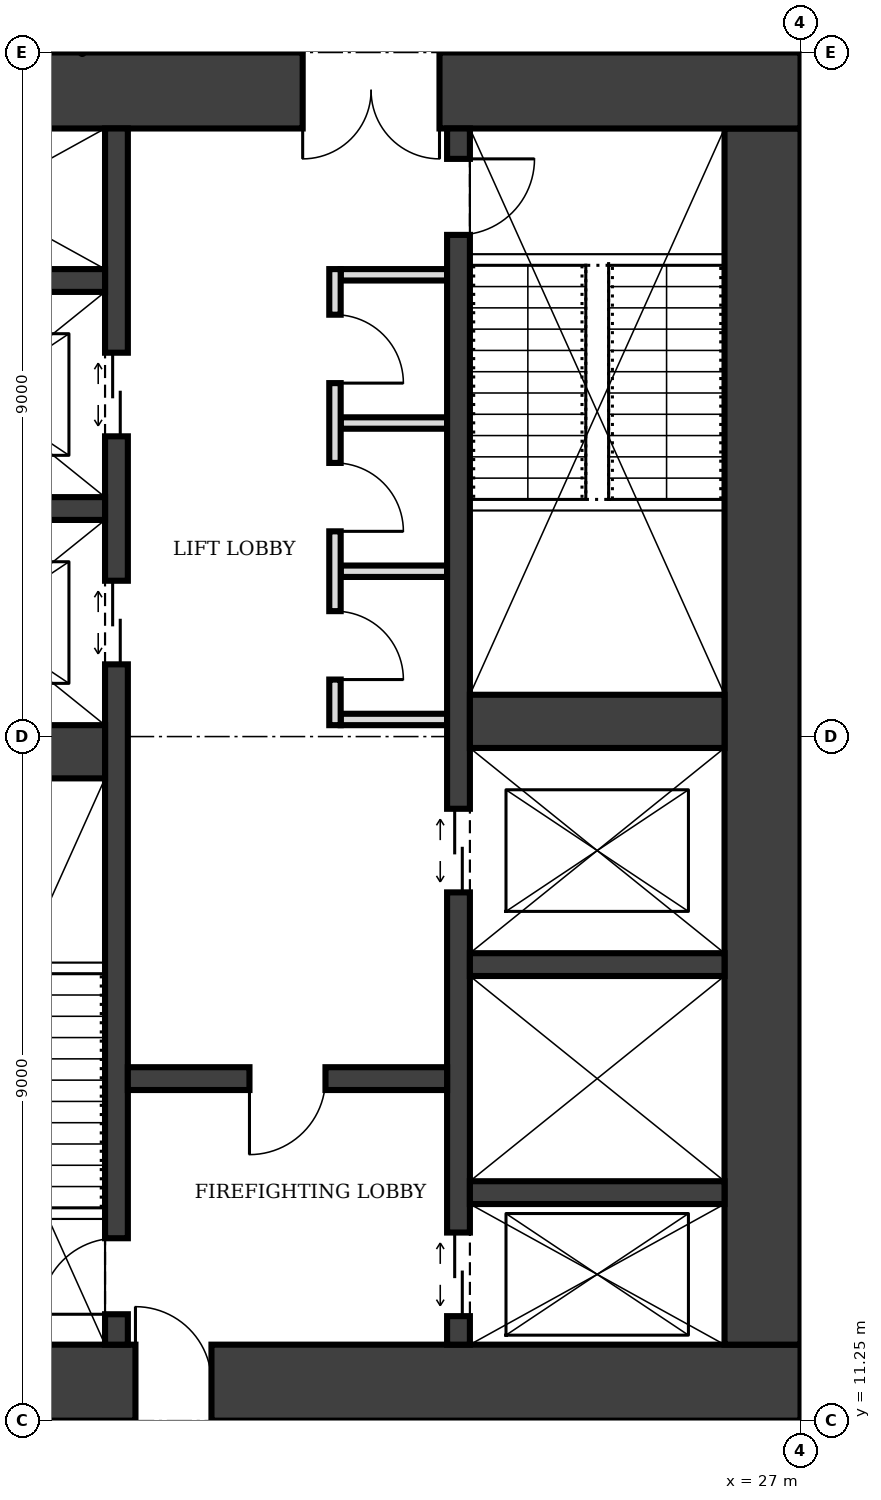
"""IFC4 building model, lengths in metres.
Left out: names, types, materials, properties, quantities, classifications, styles, units other than length and angle.
Written with IfcOpenShell. Run it as: python <this file> out.ifc"""

import sys

from ifc_helpers import new_model, si_unit, direction, frame, frame_2d, origin, place, context, subcontext, project, spatial, rectangle, extrude, element, fill, save


model = new_model("IFC4")
c1 = context("Model", 3, precision=1e-05, world=origin(), true_north=direction((0.0, 1.0)))
c2 = subcontext(c1, "Body", "Model", "MODEL_VIEW")
j1 = project(units=[si_unit("LENGTHUNIT", "METRE"), si_unit("PLANEANGLEUNIT", "RADIAN")], contexts=[c1])
p1 = place(None, origin())
s1 = spatial("IfcSite", under=j1, at=p1, CompositionType="ELEMENT")
p2 = place(p1, origin())
s2 = spatial("IfcBuilding", under=s1, at=p2, CompositionType="ELEMENT")
p3 = place(p2, frame((0.0, 0.0, 61.0)))
s3 = spatial("IfcBuildingStorey", under=s2, at=p3, CompositionType="ELEMENT", Elevation=61.0)
p4 = place(p3, frame((13.5, 11.75, 0.0), z_axis=(0.0, 0.0, 1.0), x_axis=(1.0, 0.0, 0.0)))
e1 = element("IfcWall", 1, at=p4, inside=s3, PredefinedType="SHEAR", context=c2, shape_type="SweptSolid", body=[
    extrude(rectangle(XDim=13.5, YDim=1.0, at=frame_2d((6.75, 0.0))), origin(), (0.0, 0.0, 1.0), 4.0),
])
p5 = place(p4, frame((4.75, 0.0, 0.0)))
e2 = element("IfcOpeningElement", 2, at=p5, cuts=e1, PredefinedType="OPENING", context=c2, shape_type="SweptSolid", body=[
    extrude(rectangle(XDim=1.0, YDim=2.1, at=frame_2d((0.5, 1.05))), frame((0.0, 0.51, 0.0), z_axis=(0.0, -1.0, 0.0), x_axis=(1.0, 0.0, 0.0)), (0.0, 0.0, 1.0), 1.02),
])
p6 = place(p3, frame((26.5, 12.25, 0.0), z_axis=(0.0, 0.0, 1.0), x_axis=(0.0, 1.0, 0.0)))
e3 = element("IfcWall", 3, at=p6, inside=s3, PredefinedType="SHEAR", context=c2, shape_type="SweptSolid", body=[
    extrude(rectangle(XDim=16.0, YDim=1.0, at=frame_2d((8.0, 0.0))), origin(), (0.0, 0.0, 1.0), 4.0),
])
p7 = place(p3, frame((27.0, 28.75, 0.0), z_axis=(0.0, 0.0, 1.0), x_axis=(-1.0, 0.0, 0.0)))
e4 = element("IfcWall", 4, at=p7, inside=s3, PredefinedType="SHEAR", context=c2, shape_type="SweptSolid", body=[
    extrude(rectangle(XDim=13.5, YDim=1.0, at=frame_2d((6.75, 0.0))), origin(), (0.0, 0.0, 1.0), 4.0),
])
p8 = place(p7, frame((4.75, 0.0, 0.0)))
e5 = element("IfcOpeningElement", 5, at=p8, cuts=e4, PredefinedType="OPENING", context=c2, shape_type="SweptSolid", body=[
    extrude(rectangle(XDim=1.8, YDim=2.1, at=frame_2d((0.9, 1.05))), frame((0.0, 0.51, 0.0), z_axis=(0.0, -1.0, 0.0), x_axis=(1.0, 0.0, 0.0)), (0.0, 0.0, 1.0), 1.02),
])
p9 = place(p3, frame((18.0, 12.25, 0.0), z_axis=(0.0, 0.0, 1.0), x_axis=(0.0, 1.0, 0.0)))
e6 = element("IfcWall", 6, at=p9, inside=s3, PredefinedType="SHEAR", context=c2, shape_type="SweptSolid", body=[
    extrude(rectangle(XDim=16.0, YDim=0.3, at=frame_2d((8.0, 0.0))), origin(), (0.0, 0.0, 1.0), 4.0),
])
p10 = place(p9, frame((0.4, 0.0, 0.0)))
e7 = element("IfcOpeningElement", 7, at=p10, cuts=e6, PredefinedType="OPENING", context=c2, shape_type="SweptSolid", body=[
    extrude(rectangle(XDim=1.0, YDim=2.1, at=frame_2d((0.5, 1.05))), frame((0.0, 0.16, 0.0), z_axis=(0.0, -1.0, 0.0), x_axis=(1.0, 0.0, 0.0)), (0.0, 0.0, 1.0), 0.32),
])
p11 = place(p9, frame((8.95, 0.0, 0.0)))
e8 = element("IfcOpeningElement", 8, at=p11, cuts=e6, PredefinedType="OPENING", context=c2, shape_type="SweptSolid", body=[
    extrude(rectangle(XDim=1.1, YDim=2.1, at=frame_2d((0.55, 1.05))), frame((0.0, 0.16, 0.0), z_axis=(0.0, -1.0, 0.0), x_axis=(1.0, 0.0, 0.0)), (0.0, 0.0, 1.0), 0.32),
])
p12 = place(p9, frame((11.95, 0.0, 0.0)))
e9 = element("IfcOpeningElement", 9, at=p12, cuts=e6, PredefinedType="OPENING", context=c2, shape_type="SweptSolid", body=[
    extrude(rectangle(XDim=1.1, YDim=2.1, at=frame_2d((0.55, 1.05))), frame((0.0, 0.16, 0.0), z_axis=(0.0, -1.0, 0.0), x_axis=(1.0, 0.0, 0.0)), (0.0, 0.0, 1.0), 0.32),
])
p13 = place(p3, frame((22.5, 12.25, 0.0), z_axis=(0.0, 0.0, 1.0), x_axis=(0.0, 1.0, 0.0)))
e10 = element("IfcWall", 10, at=p13, inside=s3, PredefinedType="SHEAR", context=c2, shape_type="SweptSolid", body=[
    extrude(rectangle(XDim=16.0, YDim=0.3, at=frame_2d((8.0, 0.0))), origin(), (0.0, 0.0, 1.0), 4.0),
])
p14 = place(p13, frame((14.6, 0.0, 0.0)))
e11 = element("IfcOpeningElement", 11, at=p14, cuts=e10, PredefinedType="OPENING", context=c2, shape_type="SweptSolid", body=[
    extrude(rectangle(XDim=1.0, YDim=2.1, at=frame_2d((0.5, 1.05))), frame((0.0, 0.16, 0.0), z_axis=(0.0, -1.0, 0.0), x_axis=(1.0, 0.0, 0.0)), (0.0, 0.0, 1.0), 0.32),
])
p15 = place(p13, frame((0.375, 0.0, 0.0)))
e12 = element("IfcOpeningElement", 12, at=p15, cuts=e10, PredefinedType="OPENING", context=c2, shape_type="SweptSolid", body=[
    extrude(rectangle(XDim=1.1, YDim=2.1, at=frame_2d((0.55, 1.05))), frame((0.0, 0.16, 0.0), z_axis=(0.0, -1.0, 0.0), x_axis=(1.0, 0.0, 0.0)), (0.0, 0.0, 1.0), 0.32),
])
p16 = place(p13, frame((5.95, 0.0, 0.0)))
e13 = element("IfcOpeningElement", 13, at=p16, cuts=e10, PredefinedType="OPENING", context=c2, shape_type="SweptSolid", body=[
    extrude(rectangle(XDim=1.1, YDim=2.1, at=frame_2d((0.55, 1.05))), frame((0.0, 0.16, 0.0), z_axis=(0.0, -1.0, 0.0), x_axis=(1.0, 0.0, 0.0)), (0.0, 0.0, 1.0), 0.32),
])
p17 = place(p3, frame((14.5, 20.05, 0.0), z_axis=(0.0, 0.0, 1.0), x_axis=(1.0, 0.0, 0.0)))
e14 = element("IfcWall", 14, at=p17, inside=s3, PredefinedType="SHEAR", context=c2, shape_type="SweptSolid", body=[
    extrude(rectangle(XDim=3.35, YDim=0.7, at=frame_2d((1.675, 0.0))), origin(), (0.0, 0.0, 1.0), 4.0),
])
p18 = place(p3, frame((18.15, 15.75, 0.0), z_axis=(0.0, 0.0, 1.0), x_axis=(1.0, 0.0, 0.0)))
e15 = element("IfcWall", 15, at=p18, inside=s3, PredefinedType="SHEAR", context=c2, shape_type="SweptSolid", body=[
    extrude(rectangle(XDim=4.2, YDim=0.3, at=frame_2d((2.1, 0.0))), origin(), (0.0, 0.0, 1.0), 4.0),
])
p19 = place(p18, frame((1.6, 0.0, 0.0)))
e16 = element("IfcOpeningElement", 16, at=p19, cuts=e15, PredefinedType="OPENING", context=c2, shape_type="SweptSolid", body=[
    extrude(rectangle(XDim=1.0, YDim=2.1, at=frame_2d((0.5, 1.05))), frame((0.0, 0.16, 0.0), z_axis=(0.0, -1.0, 0.0), x_axis=(1.0, 0.0, 0.0)), (0.0, 0.0, 1.0), 0.32),
])
for number, where, z_axis, x_axis in (
    (17, (22.65, 14.25, 0.0), (0.0, 0.0, 1.0), (1.0, 0.0, 0.0)),
    (18, (22.65, 17.25, 0.0), (0.0, 0.0, 1.0), (1.0, 0.0, 0.0)),
):
    element("IfcWall", number, at=place(p3, frame(where, z_axis=z_axis, x_axis=x_axis)), inside=s3, PredefinedType="SHEAR", context=c2, shape_type="SweptSolid", body=[
        extrude(rectangle(XDim=3.35, YDim=0.3, at=frame_2d((1.675, 0.0))), origin(), (0.0, 0.0, 1.0), 4.0),
    ])
p20 = place(p3, frame((22.65, 20.45, 0.0), z_axis=(0.0, 0.0, 1.0), x_axis=(1.0, 0.0, 0.0)))
e19 = element("IfcWall", 19, at=p20, inside=s3, PredefinedType="SHEAR", context=c2, shape_type="SweptSolid", body=[
    extrude(rectangle(XDim=3.35, YDim=0.7, at=frame_2d((1.675, 0.0))), origin(), (0.0, 0.0, 1.0), 4.0),
])
for number, where, z_axis, x_axis in (
    (20, (14.5, 23.25, 0.0), (0.0, 0.0, 1.0), (1.0, 0.0, 0.0)),
    (21, (14.5, 26.25, 0.0), (0.0, 0.0, 1.0), (1.0, 0.0, 0.0)),
):
    element("IfcWall", number, at=place(p3, frame(where, z_axis=z_axis, x_axis=x_axis)), inside=s3, PredefinedType="SHEAR", context=c2, shape_type="SweptSolid", body=[
        extrude(rectangle(XDim=3.35, YDim=0.3, at=frame_2d((1.675, 0.0))), origin(), (0.0, 0.0, 1.0), 4.0),
    ])
p21 = place(p3, frame((20.875, 20.4, 0.0), z_axis=(0.0, 0.0, 1.0), x_axis=(0.0, 1.0, 0.0)))
e22 = element("IfcWall", 22, at=p21, inside=s3, PredefinedType="PARTITIONING", context=c2, shape_type="SweptSolid", body=[
    extrude(rectangle(XDim=6.0, YDim=0.15, at=frame_2d((3.0, 0.0))), origin(), (0.0, 0.0, 1.0), 3.75),
])
p22 = place(p21, frame((0.6, 0.0, 0.0)))
e23 = element("IfcOpeningElement", 23, at=p22, cuts=e22, PredefinedType="OPENING", context=c2, shape_type="SweptSolid", body=[
    extrude(rectangle(XDim=0.9, YDim=2.1, at=frame_2d((0.45, 1.05))), frame((0.0, 0.085, 0.0), z_axis=(0.0, -1.0, 0.0), x_axis=(1.0, 0.0, 0.0)), (0.0, 0.0, 1.0), 0.17),
])
p23 = place(p21, frame((2.55, 0.0, 0.0)))
e24 = element("IfcOpeningElement", 24, at=p23, cuts=e22, PredefinedType="OPENING", context=c2, shape_type="SweptSolid", body=[
    extrude(rectangle(XDim=0.9, YDim=2.1, at=frame_2d((0.45, 1.05))), frame((0.0, 0.085, 0.0), z_axis=(0.0, -1.0, 0.0), x_axis=(1.0, 0.0, 0.0)), (0.0, 0.0, 1.0), 0.17),
])
p24 = place(p21, frame((4.5, 0.0, 0.0)))
e25 = element("IfcOpeningElement", 25, at=p24, cuts=e22, PredefinedType="OPENING", context=c2, shape_type="SweptSolid", body=[
    extrude(rectangle(XDim=0.9, YDim=2.1, at=frame_2d((0.45, 1.05))), frame((0.0, 0.085, 0.0), z_axis=(0.0, -1.0, 0.0), x_axis=(1.0, 0.0, 0.0)), (0.0, 0.0, 1.0), 0.17),
])
for number, where, z_axis, x_axis in (
    (26, (20.95, 20.475, 0.0), (0.0, 0.0, 1.0), (1.0, 0.0, 0.0)),
    (27, (20.95, 22.425, 0.0), (0.0, 0.0, 1.0), (1.0, 0.0, 0.0)),
    (28, (20.95, 24.375, 0.0), (0.0, 0.0, 1.0), (1.0, 0.0, 0.0)),
    (29, (20.95, 26.325, 0.0), (0.0, 0.0, 1.0), (1.0, 0.0, 0.0)),
):
    element("IfcWall", number, at=place(p3, frame(where, z_axis=z_axis, x_axis=x_axis)), inside=s3, PredefinedType="PARTITIONING", context=c2, shape_type="SweptSolid", body=[
        extrude(rectangle(XDim=1.4, YDim=0.15, at=frame_2d((0.7, 0.0))), origin(), (0.0, 0.0, 1.0), 3.75),
    ])
p25 = place(p5, origin())
e30 = element("IfcDoor", 30, at=p25, inside=s3, OperationType="SINGLE_SWING_LEFT", PredefinedType="DOOR", context=c2, shape_type="SweptSolid", body=[
    extrude(rectangle(XDim=1.0, YDim=2.1, at=frame_2d((0.5, 1.05))), frame((0.0, 0.025, 0.0), z_axis=(0.0, -1.0, 0.0), x_axis=(1.0, 0.0, 0.0)), (0.0, 0.0, 1.0), 0.05),
])
fill(e2, e30)
p26 = place(p8, origin())
e31 = element("IfcDoor", 31, at=p26, inside=s3, OperationType="DOUBLE_DOOR_SINGLE_SWING", PredefinedType="DOOR", context=c2, shape_type="SweptSolid", body=[
    extrude(rectangle(XDim=1.8, YDim=2.1, at=frame_2d((0.9, 1.05))), frame((0.0, 0.025, 0.0), z_axis=(0.0, -1.0, 0.0), x_axis=(1.0, 0.0, 0.0)), (0.0, 0.0, 1.0), 0.05),
])
fill(e5, e31)
p27 = place(p19, frame((1.0, 0.0, 0.0), z_axis=(0.0, 0.0, 1.0), x_axis=(-1.0, 0.0, 0.0)))
e32 = element("IfcDoor", 32, at=p27, inside=s3, OperationType="SINGLE_SWING_RIGHT", PredefinedType="DOOR", context=c2, shape_type="SweptSolid", body=[
    extrude(rectangle(XDim=1.0, YDim=2.1, at=frame_2d((0.5, 1.05))), frame((0.0, 0.025, 0.0), z_axis=(0.0, -1.0, 0.0), x_axis=(1.0, 0.0, 0.0)), (0.0, 0.0, 1.0), 0.05),
])
fill(e16, e32)
p28 = place(p10, origin())
e33 = element("IfcDoor", 33, at=p28, inside=s3, OperationType="SINGLE_SWING_LEFT", PredefinedType="DOOR", context=c2, shape_type="SweptSolid", body=[
    extrude(rectangle(XDim=1.0, YDim=2.1, at=frame_2d((0.5, 1.05))), frame((0.0, 0.025, 0.0), z_axis=(0.0, -1.0, 0.0), x_axis=(1.0, 0.0, 0.0)), (0.0, 0.0, 1.0), 0.05),
])
fill(e7, e33)
p29 = place(p14, frame((1.0, 0.0, 0.0), z_axis=(0.0, 0.0, 1.0), x_axis=(-1.0, 0.0, 0.0)))
e34 = element("IfcDoor", 34, at=p29, inside=s3, OperationType="SINGLE_SWING_LEFT", PredefinedType="DOOR", context=c2, shape_type="SweptSolid", body=[
    extrude(rectangle(XDim=1.0, YDim=2.1, at=frame_2d((0.5, 1.05))), frame((0.0, 0.025, 0.0), z_axis=(0.0, -1.0, 0.0), x_axis=(1.0, 0.0, 0.0)), (0.0, 0.0, 1.0), 0.05),
])
fill(e11, e34)
p30 = place(p15, origin())
e35 = element("IfcDoor", 35, at=p30, inside=s3, OperationType="DOUBLE_DOOR_SLIDING", PredefinedType="DOOR", context=c2, shape_type="SweptSolid", body=[
    extrude(rectangle(XDim=1.1, YDim=2.1, at=frame_2d((0.55, 1.05))), frame((0.0, 0.025, 0.0), z_axis=(0.0, -1.0, 0.0), x_axis=(1.0, 0.0, 0.0)), (0.0, 0.0, 1.0), 0.05),
])
fill(e12, e35)
p31 = place(p11, origin())
e36 = element("IfcDoor", 36, at=p31, inside=s3, OperationType="DOUBLE_DOOR_SLIDING", PredefinedType="DOOR", context=c2, shape_type="SweptSolid", body=[
    extrude(rectangle(XDim=1.1, YDim=2.1, at=frame_2d((0.55, 1.05))), frame((0.0, 0.025, 0.0), z_axis=(0.0, -1.0, 0.0), x_axis=(1.0, 0.0, 0.0)), (0.0, 0.0, 1.0), 0.05),
])
fill(e8, e36)
p32 = place(p12, origin())
e37 = element("IfcDoor", 37, at=p32, inside=s3, OperationType="DOUBLE_DOOR_SLIDING", PredefinedType="DOOR", context=c2, shape_type="SweptSolid", body=[
    extrude(rectangle(XDim=1.1, YDim=2.1, at=frame_2d((0.55, 1.05))), frame((0.0, 0.025, 0.0), z_axis=(0.0, -1.0, 0.0), x_axis=(1.0, 0.0, 0.0)), (0.0, 0.0, 1.0), 0.05),
])
fill(e9, e37)
p33 = place(p16, origin())
e38 = element("IfcDoor", 38, at=p33, inside=s3, OperationType="DOUBLE_DOOR_SLIDING", PredefinedType="DOOR", context=c2, shape_type="SweptSolid", body=[
    extrude(rectangle(XDim=1.1, YDim=2.1, at=frame_2d((0.55, 1.05))), frame((0.0, 0.025, 0.0), z_axis=(0.0, -1.0, 0.0), x_axis=(1.0, 0.0, 0.0)), (0.0, 0.0, 1.0), 0.05),
])
fill(e13, e38)
p34 = place(p22, frame((0.9, 0.0, 0.0), z_axis=(0.0, 0.0, 1.0), x_axis=(-1.0, 0.0, 0.0)))
e39 = element("IfcDoor", 39, at=p34, inside=s3, OperationType="SINGLE_SWING_RIGHT", PredefinedType="DOOR", context=c2, shape_type="SweptSolid", body=[
    extrude(rectangle(XDim=0.9, YDim=2.1, at=frame_2d((0.45, 1.05))), frame((0.0, 0.025, 0.0), z_axis=(0.0, -1.0, 0.0), x_axis=(1.0, 0.0, 0.0)), (0.0, 0.0, 1.0), 0.05),
])
fill(e23, e39)
p35 = place(p23, frame((0.9, 0.0, 0.0), z_axis=(0.0, 0.0, 1.0), x_axis=(-1.0, 0.0, 0.0)))
e40 = element("IfcDoor", 40, at=p35, inside=s3, OperationType="SINGLE_SWING_RIGHT", PredefinedType="DOOR", context=c2, shape_type="SweptSolid", body=[
    extrude(rectangle(XDim=0.9, YDim=2.1, at=frame_2d((0.45, 1.05))), frame((0.0, 0.025, 0.0), z_axis=(0.0, -1.0, 0.0), x_axis=(1.0, 0.0, 0.0)), (0.0, 0.0, 1.0), 0.05),
])
fill(e24, e40)
p36 = place(p24, frame((0.9, 0.0, 0.0), z_axis=(0.0, 0.0, 1.0), x_axis=(-1.0, 0.0, 0.0)))
e41 = element("IfcDoor", 41, at=p36, inside=s3, OperationType="SINGLE_SWING_RIGHT", PredefinedType="DOOR", context=c2, shape_type="SweptSolid", body=[
    extrude(rectangle(XDim=0.9, YDim=2.1, at=frame_2d((0.45, 1.05))), frame((0.0, 0.025, 0.0), z_axis=(0.0, -1.0, 0.0), x_axis=(1.0, 0.0, 0.0)), (0.0, 0.0, 1.0), 0.05),
])
fill(e25, e41)
save(model, sys.argv[1])
